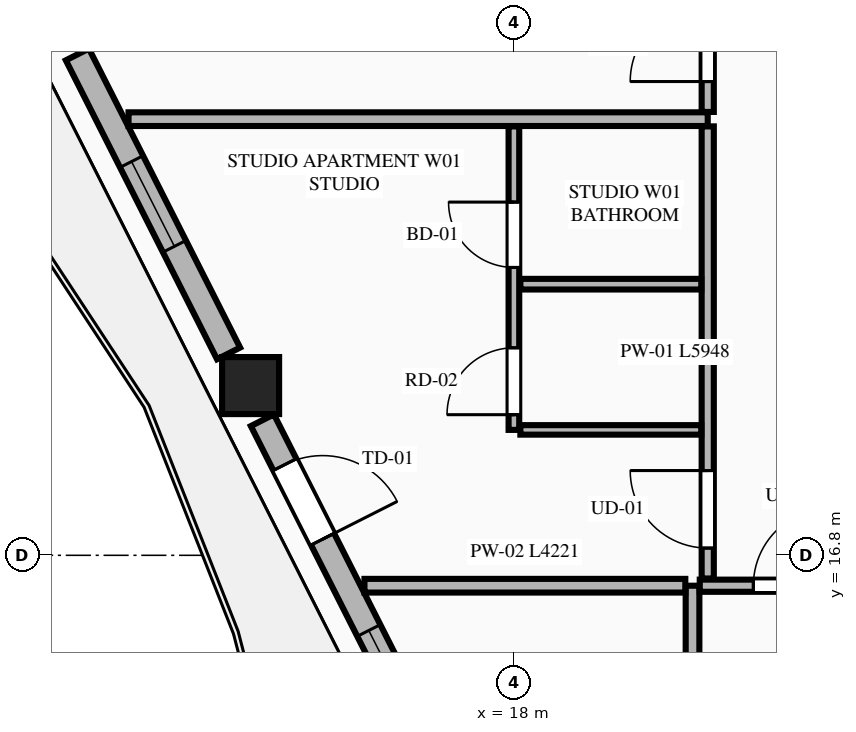
"""IFC4 building model, lengths in metres.
Left out: names, types, materials, properties, quantities, classifications, styles, units other than length and angle.
Written with IfcOpenShell. Run it as: python <this file> out.ifc"""

import sys

from ifc_helpers import new_model, si_unit, direction, frame, frame_2d, origin, origin_2d, place, context, subcontext, project, spatial, rectangle, extrude, element, fill, save


model = new_model("IFC4")
c1 = context("Model", 3, precision=1e-05, world=origin(), true_north=direction((0.0, 1.0)))
c2 = subcontext(c1, "Body", "Model", "MODEL_VIEW")
j1 = project(units=[si_unit("LENGTHUNIT", "METRE"), si_unit("PLANEANGLEUNIT", "RADIAN")], contexts=[c1])
p1 = place(None, origin())
s1 = spatial("IfcSite", under=j1, at=p1, CompositionType="ELEMENT")
p2 = place(p1, origin())
s2 = spatial("IfcBuilding", under=s1, at=p2, CompositionType="ELEMENT")
p3 = place(p2, frame((0.0, 0.0, 241.6)))
s3 = spatial("IfcBuildingStorey", under=s2, at=p3, CompositionType="ELEMENT", Elevation=241.6)
p4 = place(p3, frame((14.536, 19.033, 0.0), z_axis=(0.0, 0.0, 1.0), x_axis=(1.0, 0.0, 0.0)))
e1 = element("IfcColumn", 1, at=p4, inside=s3, PredefinedType="COLUMN", context=c2, shape_type="SweptSolid", body=[
    extrude(rectangle(XDim=0.75, YDim=0.75, at=origin_2d()), origin(), (0.0, 0.0, 1.0), 3.65),
])
p5 = place(p3, frame((12.257, 23.389, 0.0), z_axis=(0.0, 0.0, 1.0), x_axis=(0.45130817501, -0.892368158984, 0.0)))
e2 = element("IfcWall", 2, at=p5, inside=s3, PredefinedType="STANDARD", context=c2, shape_type="SweptSolid", body=[
    extrude(rectangle(XDim=4.407, YDim=0.34, at=frame_2d((2.204, 0.0))), origin(), (0.0, 0.0, 1.0), 2.983),
])
p6 = place(p5, frame((1.579, 0.0, 0.75)))
e3 = element("IfcOpeningElement", 3, at=p6, cuts=e2, PredefinedType="OPENING", context=c2, shape_type="SweptSolid", body=[
    extrude(rectangle(XDim=1.25, YDim=1.95, at=frame_2d((0.625, 0.975))), frame((0.0, 0.18, 0.0), z_axis=(0.0, -1.0, 0.0), x_axis=(1.0, 0.0, 0.0)), (0.0, 0.0, 1.0), 0.36),
])
p7 = place(p3, frame((14.691, 18.577, 0.0), z_axis=(0.0, 0.0, 1.0), x_axis=(0.451581819983, -0.892229712496, 0.0)))
e4 = element("IfcWall", 4, at=p7, inside=s3, PredefinedType="STANDARD", context=c2, shape_type="SweptSolid", body=[
    extrude(rectangle(XDim=4.6, YDim=0.34, at=frame_2d((2.3, 0.0))), origin(), (0.0, 0.0, 1.0), 2.983),
])
p8 = place(p7, frame((0.654, 0.0, 0.0)))
e5 = element("IfcOpeningElement", 5, at=p8, cuts=e4, PredefinedType="OPENING", context=c2, shape_type="SweptSolid", body=[
    extrude(rectangle(XDim=1.1, YDim=2.25, at=frame_2d((0.55, 1.125))), frame((0.0, 0.18, 0.0), z_axis=(0.0, -1.0, 0.0), x_axis=(1.0, 0.0, 0.0)), (0.0, 0.0, 1.0), 0.36),
])
p9 = place(p7, frame((3.1, 0.0, 0.75)))
e6 = element("IfcOpeningElement", 6, at=p9, cuts=e4, PredefinedType="OPENING", context=c2, shape_type="SweptSolid", body=[
    extrude(rectangle(XDim=1.1, YDim=2.0, at=frame_2d((0.55, 1.0))), frame((0.0, 0.18, 0.0), z_axis=(0.0, -1.0, 0.0), x_axis=(1.0, 0.0, 0.0)), (0.0, 0.0, 1.0), 0.36),
])
p10 = place(p3, frame((20.35, 8.119, 0.0), z_axis=(0.0, 0.0, 1.0), x_axis=(0.0, 1.0, 0.0)))
e7 = element("IfcWall", 7, at=p10, inside=s3, PredefinedType="PARTITIONING", context=c2, shape_type="SweptSolid", body=[
    extrude(rectangle(XDim=8.281, YDim=0.18, at=frame_2d((4.141, 0.0))), origin(), (0.0, 0.0, 1.0), 3.45),
])
p11 = place(p3, frame((20.445, 16.4, 0.0), z_axis=(0.0, 0.0, 1.0), x_axis=(1.0, 0.0, 0.0)))
e8 = element("IfcWall", 8, at=p11, inside=s3, PredefinedType="PARTITIONING", context=c2, shape_type="SweptSolid", body=[
    extrude(rectangle(XDim=8.606, YDim=0.16, at=frame_2d((4.303, 0.0))), origin(), (0.0, 0.0, 1.0), 3.45),
])
p12 = place(p11, frame((0.705, 0.0, 0.0)))
e9 = element("IfcOpeningElement", 9, at=p12, cuts=e8, PredefinedType="OPENING", context=c2, shape_type="SweptSolid", body=[
    extrude(rectangle(XDim=1.02, YDim=2.25, at=frame_2d((0.51, 1.125))), frame((0.0, 0.09, 0.0), z_axis=(0.0, -1.0, 0.0), x_axis=(1.0, 0.0, 0.0)), (0.0, 0.0, 1.0), 0.18),
])
p13 = place(p3, frame((16.034, 16.4, 0.0), z_axis=(0.0, 0.0, 1.0), x_axis=(1.0, 0.0, 0.0)))
e10 = element("IfcWall", 10, at=p13, inside=s3, PredefinedType="PARTITIONING", context=c2, shape_type="SweptSolid", body=[
    extrude(rectangle(XDim=4.221, YDim=0.18, at=frame_2d((2.11, 0.0))), origin(), (0.0, 0.0, 1.0), 3.45),
])
p14 = place(p3, frame((20.55, 16.495, 0.0), z_axis=(0.0, 0.0, 1.0), x_axis=(0.0, 1.0, 0.0)))
e11 = element("IfcWall", 11, at=p14, inside=s3, PredefinedType="PARTITIONING", context=c2, shape_type="SweptSolid", body=[
    extrude(rectangle(XDim=5.948, YDim=0.16, at=frame_2d((2.974, 0.0))), origin(), (0.0, 0.0, 1.0), 3.137),
])
p15 = place(p14, frame((0.4, 0.0, 0.0)))
e12 = element("IfcOpeningElement", 12, at=p15, cuts=e11, PredefinedType="OPENING", context=c2, shape_type="SweptSolid", body=[
    extrude(rectangle(XDim=1.02, YDim=2.25, at=frame_2d((0.51, 1.125))), frame((0.0, 0.09, 0.0), z_axis=(0.0, -1.0, 0.0), x_axis=(1.0, 0.0, 0.0)), (0.0, 0.0, 1.0), 0.18),
])
p16 = place(p3, frame((18.085, 18.45, 0.0), z_axis=(0.0, 0.0, 1.0), x_axis=(1.0, 0.0, 0.0)))
e13 = element("IfcWall", 13, at=p16, inside=s3, PredefinedType="PARTITIONING", context=c2, shape_type="SweptSolid", body=[
    extrude(rectangle(XDim=2.38, YDim=0.125, at=frame_2d((1.19, 0.0))), origin(), (0.0, 0.0, 1.0), 3.45),
])
p17 = place(p3, frame((18.0, 18.45, 0.0), z_axis=(0.0, 0.0, 1.0), x_axis=(0.0, 1.0, 0.0)))
e14 = element("IfcWall", 14, at=p17, inside=s3, PredefinedType="PLUMBINGWALL", context=c2, shape_type="SweptSolid", body=[
    extrude(rectangle(XDim=3.993, YDim=0.14, at=frame_2d((1.997, 0.0))), origin(), (0.0, 0.0, 1.0), 3.45),
])
p18 = place(p17, frame((2.137, 0.0, 0.0)))
e15 = element("IfcOpeningElement", 15, at=p18, cuts=e14, PredefinedType="OPENING", context=c2, shape_type="SweptSolid", body=[
    extrude(rectangle(XDim=0.86, YDim=2.1, at=frame_2d((0.43, 1.05))), frame((0.0, 0.08, 0.0), z_axis=(0.0, -1.0, 0.0), x_axis=(1.0, 0.0, 0.0)), (0.0, 0.0, 1.0), 0.16),
])
p19 = place(p17, frame((0.2, 0.0, 0.0)))
e16 = element("IfcOpeningElement", 16, at=p19, cuts=e14, PredefinedType="OPENING", context=c2, shape_type="SweptSolid", body=[
    extrude(rectangle(XDim=0.88, YDim=2.15, at=frame_2d((0.44, 1.075))), frame((0.0, 0.08, 0.0), z_axis=(0.0, -1.0, 0.0), x_axis=(1.0, 0.0, 0.0)), (0.0, 0.0, 1.0), 0.16),
])
p20 = place(p3, frame((18.085, 20.367, 0.0), z_axis=(0.0, 0.0, 1.0), x_axis=(1.0, 0.0, 0.0)))
e17 = element("IfcWall", 17, at=p20, inside=s3, PredefinedType="PLUMBINGWALL", context=c2, shape_type="SweptSolid", body=[
    extrude(rectangle(XDim=2.38, YDim=0.14, at=frame_2d((1.19, 0.0))), origin(), (0.0, 0.0, 1.0), 3.45),
])
p21 = place(p3, frame((12.93, 22.538, 0.0), z_axis=(0.0, 0.0, 1.0), x_axis=(1.0, 0.0, 0.0)))
e18 = element("IfcWall", 18, at=p21, inside=s3, PredefinedType="PARTITIONING", context=c2, shape_type="SweptSolid", body=[
    extrude(rectangle(XDim=7.62, YDim=0.18, at=frame_2d((3.81, 0.0))), origin(), (0.0, 0.0, 1.0), 3.45),
])
p22 = place(p3, frame((20.55, 22.633, 0.0), z_axis=(0.0, 0.0, 1.0), x_axis=(0.0, 1.0, 0.0)))
e19 = element("IfcWall", 19, at=p22, inside=s3, PredefinedType="PARTITIONING", context=c2, shape_type="SweptSolid", body=[
    extrude(rectangle(XDim=6.134, YDim=0.16, at=frame_2d((3.067, 0.0))), origin(), (0.0, 0.0, 1.0), 3.137),
])
p23 = place(p22, frame((0.4, 0.0, 0.0)))
e20 = element("IfcOpeningElement", 20, at=p23, cuts=e19, PredefinedType="OPENING", context=c2, shape_type="SweptSolid", body=[
    extrude(rectangle(XDim=1.02, YDim=2.25, at=frame_2d((0.51, 1.125))), frame((0.0, 0.09, 0.0), z_axis=(0.0, -1.0, 0.0), x_axis=(1.0, 0.0, 0.0)), (0.0, 0.0, 1.0), 0.18),
])
p24 = place(p6, origin())
e21 = element("IfcWindow", 21, at=p24, inside=s3, PartitioningType="SINGLE_PANEL", PredefinedType="WINDOW", context=c2, shape_type="SweptSolid", body=[
    extrude(rectangle(XDim=1.25, YDim=1.95, at=frame_2d((0.625, 0.975))), frame((0.0, 0.03, 0.0), z_axis=(0.0, -1.0, 0.0), x_axis=(1.0, 0.0, 0.0)), (0.0, 0.0, 1.0), 0.06),
])
fill(e3, e21)
p25 = place(p8, origin())
e22 = element("IfcDoor", 22, at=p25, inside=s3, OperationType="SINGLE_SWING_RIGHT", PredefinedType="DOOR", context=c2, shape_type="SweptSolid", body=[
    extrude(rectangle(XDim=1.1, YDim=2.25, at=frame_2d((0.55, 1.125))), frame((0.0, 0.025, 0.0), z_axis=(0.0, -1.0, 0.0), x_axis=(1.0, 0.0, 0.0)), (0.0, 0.0, 1.0), 0.05),
])
fill(e5, e22)
p26 = place(p12, origin())
e23 = element("IfcDoor", 23, at=p26, inside=s3, OperationType="SINGLE_SWING_RIGHT", PredefinedType="DOOR", context=c2, shape_type="SweptSolid", body=[
    extrude(rectangle(XDim=1.02, YDim=2.25, at=frame_2d((0.51, 1.125))), frame((0.0, 0.025, 0.0), z_axis=(0.0, -1.0, 0.0), x_axis=(1.0, 0.0, 0.0)), (0.0, 0.0, 1.0), 0.05),
])
fill(e9, e23)
p27 = place(p18, origin())
e24 = element("IfcDoor", 24, at=p27, inside=s3, OperationType="SINGLE_SWING_RIGHT", PredefinedType="DOOR", context=c2, shape_type="SweptSolid", body=[
    extrude(rectangle(XDim=0.86, YDim=2.1, at=frame_2d((0.43, 1.05))), frame((0.0, 0.025, 0.0), z_axis=(0.0, -1.0, 0.0), x_axis=(1.0, 0.0, 0.0)), (0.0, 0.0, 1.0), 0.05),
])
fill(e15, e24)
p28 = place(p15, origin())
e25 = element("IfcDoor", 25, at=p28, inside=s3, OperationType="SINGLE_SWING_RIGHT", PredefinedType="DOOR", context=c2, shape_type="SweptSolid", body=[
    extrude(rectangle(XDim=1.02, YDim=2.25, at=frame_2d((0.51, 1.125))), frame((0.0, 0.025, 0.0), z_axis=(0.0, -1.0, 0.0), x_axis=(1.0, 0.0, 0.0)), (0.0, 0.0, 1.0), 0.05),
])
fill(e12, e25)
p29 = place(p19, origin())
e26 = element("IfcDoor", 26, at=p29, inside=s3, OperationType="SINGLE_SWING_LEFT", PredefinedType="DOOR", context=c2, shape_type="SweptSolid", body=[
    extrude(rectangle(XDim=0.88, YDim=2.15, at=frame_2d((0.44, 1.075))), frame((0.0, 0.025, 0.0), z_axis=(0.0, -1.0, 0.0), x_axis=(1.0, 0.0, 0.0)), (0.0, 0.0, 1.0), 0.05),
])
fill(e16, e26)
p30 = place(p23, origin())
e27 = element("IfcDoor", 27, at=p30, inside=s3, OperationType="SINGLE_SWING_LEFT", PredefinedType="DOOR", context=c2, shape_type="SweptSolid", body=[
    extrude(rectangle(XDim=1.02, YDim=2.25, at=frame_2d((0.51, 1.125))), frame((0.0, 0.025, 0.0), z_axis=(0.0, -1.0, 0.0), x_axis=(1.0, 0.0, 0.0)), (0.0, 0.0, 1.0), 0.05),
])
fill(e20, e27)
p31 = place(p9, origin())
e28 = element("IfcWindow", 28, at=p31, inside=s3, PartitioningType="SINGLE_PANEL", PredefinedType="WINDOW", context=c2, shape_type="SweptSolid", body=[
    extrude(rectangle(XDim=1.1, YDim=2.0, at=frame_2d((0.55, 1.0))), frame((0.0, 0.03, 0.0), z_axis=(0.0, -1.0, 0.0), x_axis=(1.0, 0.0, 0.0)), (0.0, 0.0, 1.0), 0.06),
])
fill(e6, e28)
save(model, sys.argv[1])
